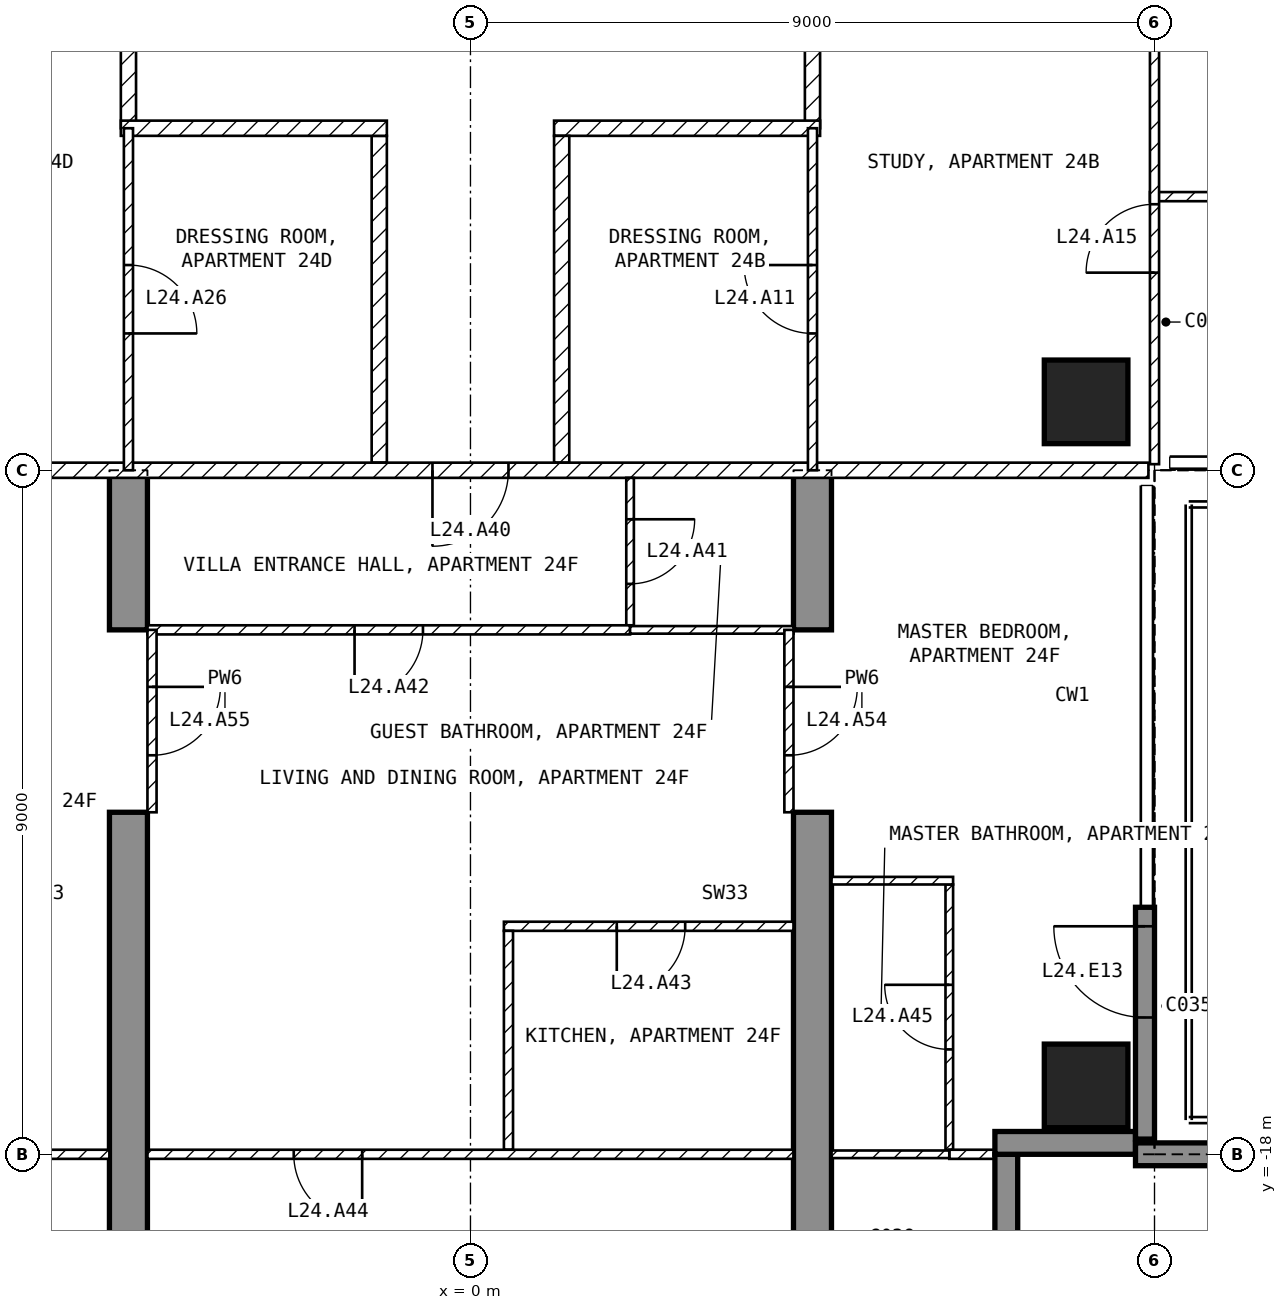
"""IFC4 building model, lengths in metres.
Left out: names, types, materials, properties, quantities, classifications, styles, units other than length and angle.
Written with IfcOpenShell. Run it as: python <this file> out.ifc"""

import sys

from ifc_helpers import new_model, si_unit, direction, frame, frame_2d, origin, origin_2d, place, context, subcontext, project, spatial, polyline, rectangle, outline, extrude, element, fill, save


model = new_model("IFC4")
c1 = context("Model", 3, precision=1e-05, world=origin(), true_north=direction((0.0, 1.0)))
c2 = subcontext(c1, "Body", "Model", "MODEL_VIEW")
j1 = project(units=[si_unit("LENGTHUNIT", "METRE"), si_unit("PLANEANGLEUNIT", "RADIAN")], contexts=[c1])
p1 = place(None, origin())
s1 = spatial("IfcSite", under=j1, at=p1, CompositionType="ELEMENT")
p2 = place(p1, origin())
s2 = spatial("IfcBuilding", under=s1, at=p2, CompositionType="ELEMENT")
p3 = place(p2, frame((0.0, 0.0, 105.9)))
s3 = spatial("IfcBuildingStorey", under=s2, at=p3, CompositionType="ELEMENT", Elevation=105.9)
for number, where, z_axis, x_axis in (
    (1, (8.1, -17.1, -0.25), (0.0, 0.0, 1.0), (1.0, 0.0, 0.0)),
    (2, (8.1, -8.1, -0.25), (0.0, 0.0, 1.0), (1.0, 0.0, 0.0)),
):
    element("IfcColumn", number, at=place(p3, frame(where, z_axis=z_axis, x_axis=x_axis)), inside=s3, PredefinedType="COLUMN", context=c2, shape_type="SweptSolid", body=[
        extrude(rectangle(XDim=1.1, YDim=1.1, at=origin_2d()), origin(), (0.0, 0.0, 1.0), 3.5),
    ])
for number, where, z_axis, x_axis in (
    (3, (-4.75, -20.15, -0.25), (1.0, 0.0, 0.0), (0.0, 1.0, 0.0)),
    (4, (4.25, -20.15, -0.25), (1.0, 0.0, 0.0), (0.0, 1.0, 0.0)),
):
    element("IfcWall", number, at=place(p3, frame(where, z_axis=z_axis, x_axis=x_axis)), inside=s3, PredefinedType="SHEAR", context=c2, shape_type="SweptSolid", body=[
        extrude(outline(polyline([(0.0, 0.0), (6.65, 0.0), (6.65, 2.65), (9.05, 2.65), (9.05, 0.0), (11.15, 0.0), (11.15, 3.5), (0.0, 3.5), (0.0, 0.0)])), origin(), (0.0, 0.0, 1.0), 0.5),
    ])
p4 = place(p3, frame((8.875, -17.8, 0.0), z_axis=(0.0, 0.0, 1.0), x_axis=(0.0, 1.0, 0.0)))
e5 = element("IfcWall", 5, at=p4, inside=s3, PredefinedType="SOLIDWALL", context=c2, shape_type="SweptSolid", body=[
    extrude(rectangle(XDim=3.05, YDim=0.25, at=frame_2d((1.525, 0.0))), origin(), (0.0, 0.0, 1.0), 3.25),
])
p5 = place(p4, frame((1.6, 0.0, 0.0)))
e6 = element("IfcOpeningElement", 6, at=p5, cuts=e5, PredefinedType="OPENING", context=c2, shape_type="SweptSolid", body=[
    extrude(rectangle(XDim=1.2, YDim=2.4, at=frame_2d((0.6, 1.2))), frame((0.0, 0.135, 0.0), z_axis=(0.0, -1.0, 0.0), x_axis=(1.0, 0.0, 0.0)), (0.0, 0.0, 1.0), 0.27),
])
p6 = place(p3, frame((7.05, -19.8, 0.0), z_axis=(0.0, 0.0, 1.0), x_axis=(0.0, 1.0, 0.0)))
e7 = element("IfcWall", 7, at=p6, inside=s3, PredefinedType="SOLIDWALL", context=c2, shape_type="SweptSolid", body=[
    extrude(rectangle(XDim=1.8, YDim=0.3, at=frame_2d((0.9, 0.0))), origin(), (0.0, 0.0, 1.0), 3.25),
])
p7 = place(p3, frame((6.9, -17.85, 0.0), z_axis=(0.0, 0.0, 1.0), x_axis=(1.0, 0.0, 0.0)))
e8 = element("IfcWall", 8, at=p7, inside=s3, PredefinedType="SOLIDWALL", context=c2, shape_type="SweptSolid", body=[
    extrude(rectangle(XDim=1.85, YDim=0.3, at=frame_2d((0.925, 0.0))), origin(), (0.0, 0.0, 1.0), 3.25),
])
p8 = place(p3, frame((8.75, -18.0, 0.0), z_axis=(0.0, 0.0, 1.0), x_axis=(1.0, 0.0, 0.0)))
e9 = element("IfcWall", 9, at=p8, inside=s3, PredefinedType="SOLIDWALL", context=c2, shape_type="SweptSolid", body=[
    extrude(rectangle(XDim=2.99, YDim=0.3, at=frame_2d((1.495, 0.0))), origin(), (0.0, 0.0, 1.0), 3.25),
])
p9 = place(p3, frame((4.5, -1.3, 0.0), z_axis=(0.0, 0.0, 1.0), x_axis=(0.0, -1.0, 0.0)))
e10 = element("IfcWall", 10, at=p9, inside=s3, PredefinedType="PARTITIONING", context=c2, shape_type="SweptSolid", body=[
    extrude(rectangle(XDim=3.2, YDim=0.2, at=frame_2d((1.6, 0.0))), origin(), (0.0, 0.0, 1.0), 3.25),
])
p10 = place(p3, frame((4.6, -4.5, 0.0), z_axis=(0.0, 0.0, 1.0), x_axis=(-1.0, 0.0, 0.0)))
e11 = element("IfcWall", 11, at=p10, inside=s3, PredefinedType="PARTITIONING", context=c2, shape_type="SweptSolid", body=[
    extrude(rectangle(XDim=3.5, YDim=0.2, at=frame_2d((1.75, 0.0))), origin(), (0.0, 0.0, 1.0), 3.25),
])
p11 = place(p3, frame((1.2, -4.6, 0.0), z_axis=(0.0, 0.0, 1.0), x_axis=(0.0, -1.0, 0.0)))
e12 = element("IfcWall", 12, at=p11, inside=s3, PredefinedType="PARTITIONING", context=c2, shape_type="SweptSolid", body=[
    extrude(rectangle(XDim=4.3, YDim=0.2, at=frame_2d((2.15, 0.0))), origin(), (0.0, 0.0, 1.0), 3.25),
])
p12 = place(p3, frame((-4.5, -4.5, 0.0), z_axis=(0.0, 0.0, 1.0), x_axis=(0.0, 1.0, 0.0)))
e13 = element("IfcWall", 13, at=p12, inside=s3, PredefinedType="PARTITIONING", context=c2, shape_type="SweptSolid", body=[
    extrude(rectangle(XDim=3.2, YDim=0.2, at=frame_2d((1.6, 0.0))), origin(), (0.0, 0.0, 1.0), 3.25),
])
p13 = place(p3, frame((-1.2, -8.9, 0.0), z_axis=(0.0, 0.0, 1.0), x_axis=(0.0, 1.0, 0.0)))
e14 = element("IfcWall", 14, at=p13, inside=s3, PredefinedType="PARTITIONING", context=c2, shape_type="SweptSolid", body=[
    extrude(rectangle(XDim=4.3, YDim=0.2, at=frame_2d((2.15, 0.0))), origin(), (0.0, 0.0, 1.0), 3.25),
])
p14 = place(p3, frame((-1.1, -4.5, 0.0), z_axis=(0.0, 0.0, 1.0), x_axis=(-1.0, 0.0, 0.0)))
e15 = element("IfcWall", 15, at=p14, inside=s3, PredefinedType="PARTITIONING", context=c2, shape_type="SweptSolid", body=[
    extrude(rectangle(XDim=3.5, YDim=0.2, at=frame_2d((1.75, 0.0))), origin(), (0.0, 0.0, 1.0), 3.25),
])
p15 = place(p3, frame((8.92, -9.0, 0.0), z_axis=(0.0, 0.0, 1.0), x_axis=(-1.0, 0.0, 0.0)))
e16 = element("IfcWall", 16, at=p15, inside=s3, PredefinedType="PARTITIONING", context=c2, shape_type="SweptSolid", body=[
    extrude(rectangle(XDim=17.84, YDim=0.2, at=frame_2d((8.92, 0.0))), origin(), (0.0, 0.0, 1.0), 3.25),
])
p16 = place(p15, frame((8.42, 0.0, 0.0)))
e17 = element("IfcOpeningElement", 17, at=p16, cuts=e16, PredefinedType="OPENING", context=c2, shape_type="SweptSolid", body=[
    extrude(rectangle(XDim=1.0, YDim=2.1, at=frame_2d((0.5, 1.05))), frame((0.0, 0.11, 0.0), z_axis=(0.0, -1.0, 0.0), x_axis=(1.0, 0.0, 0.0)), (0.0, 0.0, 1.0), 0.22),
])
p17 = place(p3, frame((18.75, -5.4, 0.0), z_axis=(0.0, 0.0, 1.0), x_axis=(-1.0, 0.0, 0.0)))
e18 = element("IfcWall", 18, at=p17, inside=s3, PredefinedType="PARTITIONING", context=c2, shape_type="SweptSolid", body=[
    extrude(rectangle(XDim=9.81, YDim=0.12, at=frame_2d((4.905, 0.0))), origin(), (0.0, 0.0, 1.0), 3.25),
])
p18 = place(p17, frame((7.5, 0.0, 0.0)))
e19 = element("IfcOpeningElement", 19, at=p18, cuts=e18, PredefinedType="OPENING", context=c2, shape_type="SweptSolid", body=[
    extrude(rectangle(XDim=0.9, YDim=2.1, at=frame_2d((0.45, 1.05))), frame((0.0, 0.07, 0.0), z_axis=(0.0, -1.0, 0.0), x_axis=(1.0, 0.0, 0.0)), (0.0, 0.0, 1.0), 0.14),
])
p19 = place(p17, frame((1.425, 0.0, 0.0)))
e20 = element("IfcOpeningElement", 20, at=p19, cuts=e18, PredefinedType="OPENING", context=c2, shape_type="SweptSolid", body=[
    extrude(rectangle(XDim=0.9, YDim=2.1, at=frame_2d((0.45, 1.05))), frame((0.0, 0.07, 0.0), z_axis=(0.0, -1.0, 0.0), x_axis=(1.0, 0.0, 0.0)), (0.0, 0.0, 1.0), 0.14),
])
p20 = place(p3, frame((9.0, -8.92, 0.0), z_axis=(0.0, 0.0, 1.0), x_axis=(0.0, 1.0, 0.0)))
e21 = element("IfcWall", 21, at=p20, inside=s3, PredefinedType="PARTITIONING", context=c2, shape_type="SweptSolid", body=[
    extrude(rectangle(XDim=7.62, YDim=0.12, at=frame_2d((3.81, 0.0))), origin(), (0.0, 0.0, 1.0), 3.25),
])
p21 = place(p20, frame((2.52, 0.0, 0.0)))
e22 = element("IfcOpeningElement", 22, at=p21, cuts=e21, PredefinedType="OPENING", context=c2, shape_type="SweptSolid", body=[
    extrude(rectangle(XDim=0.9, YDim=2.1, at=frame_2d((0.45, 1.05))), frame((0.0, 0.07, 0.0), z_axis=(0.0, -1.0, 0.0), x_axis=(1.0, 0.0, 0.0)), (0.0, 0.0, 1.0), 0.14),
])
p22 = place(p3, frame((4.5, -9.0, 0.0), z_axis=(0.0, 0.0, 1.0), x_axis=(0.0, 1.0, 0.0)))
e23 = element("IfcWall", 23, at=p22, inside=s3, PredefinedType="PARTITIONING", context=c2, shape_type="SweptSolid", body=[
    extrude(rectangle(XDim=4.5, YDim=0.12, at=frame_2d((2.25, 0.0))), origin(), (0.0, 0.0, 1.0), 3.25),
])
p23 = place(p22, frame((1.8, 0.0, 0.0)))
e24 = element("IfcOpeningElement", 24, at=p23, cuts=e23, PredefinedType="OPENING", context=c2, shape_type="SweptSolid", body=[
    extrude(rectangle(XDim=0.9, YDim=2.1, at=frame_2d((0.45, 1.05))), frame((0.0, 0.07, 0.0), z_axis=(0.0, -1.0, 0.0), x_axis=(1.0, 0.0, 0.0)), (0.0, 0.0, 1.0), 0.14),
])
p24 = place(p3, frame((-4.5, -4.5, 0.0), z_axis=(0.0, 0.0, 1.0), x_axis=(0.0, -1.0, 0.0)))
e25 = element("IfcWall", 25, at=p24, inside=s3, PredefinedType="PARTITIONING", context=c2, shape_type="SweptSolid", body=[
    extrude(rectangle(XDim=4.5, YDim=0.12, at=frame_2d((2.25, 0.0))), origin(), (0.0, 0.0, 1.0), 3.25),
])
p25 = place(p24, frame((1.8, 0.0, 0.0)))
e26 = element("IfcOpeningElement", 26, at=p25, cuts=e25, PredefinedType="OPENING", context=c2, shape_type="SweptSolid", body=[
    extrude(rectangle(XDim=0.9, YDim=2.1, at=frame_2d((0.45, 1.05))), frame((0.0, 0.07, 0.0), z_axis=(0.0, -1.0, 0.0), x_axis=(1.0, 0.0, 0.0)), (0.0, 0.0, 1.0), 0.14),
])
p26 = place(p3, frame((2.1, -9.1, 0.0), z_axis=(0.0, 0.0, 1.0), x_axis=(0.0, -1.0, 0.0)))
e27 = element("IfcWall", 27, at=p26, inside=s3, PredefinedType="PARTITIONING", context=c2, shape_type="SweptSolid", body=[
    extrude(rectangle(XDim=1.94, YDim=0.1, at=frame_2d((0.97, 0.0))), origin(), (0.0, 0.0, 1.0), 3.25),
])
p27 = place(p26, frame((0.545, 0.0, 0.0)))
e28 = element("IfcOpeningElement", 28, at=p27, cuts=e27, PredefinedType="OPENING", context=c2, shape_type="SweptSolid", body=[
    extrude(rectangle(XDim=0.85, YDim=2.1, at=frame_2d((0.425, 1.05))), frame((0.0, 0.06, 0.0), z_axis=(0.0, -1.0, 0.0), x_axis=(1.0, 0.0, 0.0)), (0.0, 0.0, 1.0), 0.12),
])
p28 = place(p3, frame((2.1, -11.1, 0.0), z_axis=(0.0, 0.0, 1.0), x_axis=(-1.0, 0.0, 0.0)))
e29 = element("IfcWall", 29, at=p28, inside=s3, PredefinedType="PARTITIONING", context=c2, shape_type="SweptSolid", body=[
    extrude(rectangle(XDim=6.35, YDim=0.12, at=frame_2d((3.175, 0.0))), origin(), (0.0, 0.0, 1.0), 3.25),
])
p29 = place(p28, frame((2.725, 0.0, 0.0)))
e30 = element("IfcOpeningElement", 30, at=p29, cuts=e29, PredefinedType="OPENING", context=c2, shape_type="SweptSolid", body=[
    extrude(rectangle(XDim=0.9, YDim=2.1, at=frame_2d((0.45, 1.05))), frame((0.0, 0.07, 0.0), z_axis=(0.0, -1.0, 0.0), x_axis=(1.0, 0.0, 0.0)), (0.0, 0.0, 1.0), 0.14),
])
p30 = place(p3, frame((4.25, -11.1, 0.0), z_axis=(0.0, 0.0, 1.0), x_axis=(-1.0, 0.0, 0.0)))
e31 = element("IfcWall", 31, at=p30, inside=s3, PredefinedType="PARTITIONING", context=c2, shape_type="SweptSolid", body=[
    extrude(rectangle(XDim=2.15, YDim=0.1, at=frame_2d((1.075, 0.0))), origin(), (0.0, 0.0, 1.0), 3.25),
])
p31 = place(p3, frame((4.25, -15.0, 0.0), z_axis=(0.0, 0.0, 1.0), x_axis=(-1.0, 0.0, 0.0)))
e32 = element("IfcWall", 32, at=p31, inside=s3, PredefinedType="PARTITIONING", context=c2, shape_type="SweptSolid", body=[
    extrude(rectangle(XDim=3.81, YDim=0.12, at=frame_2d((1.905, 0.0))), origin(), (0.0, 0.0, 1.0), 3.25),
])
p32 = place(p31, frame((1.425, 0.0, 0.0)))
e33 = element("IfcOpeningElement", 33, at=p32, cuts=e32, PredefinedType="OPENING", context=c2, shape_type="SweptSolid", body=[
    extrude(rectangle(XDim=0.9, YDim=2.1, at=frame_2d((0.45, 1.05))), frame((0.0, 0.07, 0.0), z_axis=(0.0, -1.0, 0.0), x_axis=(1.0, 0.0, 0.0)), (0.0, 0.0, 1.0), 0.14),
])
p33 = place(p3, frame((0.5, -15.06, 0.0), z_axis=(0.0, 0.0, 1.0), x_axis=(0.0, -1.0, 0.0)))
e34 = element("IfcWall", 34, at=p33, inside=s3, PredefinedType="PARTITIONING", context=c2, shape_type="SweptSolid", body=[
    extrude(rectangle(XDim=2.88, YDim=0.12, at=frame_2d((1.44, 0.0))), origin(), (0.0, 0.0, 1.0), 3.25),
])
p34 = place(p3, frame((4.25, -18.0, 0.0), z_axis=(0.0, 0.0, 1.0), x_axis=(-1.0, 0.0, 0.0)))
e35 = element("IfcWall", 35, at=p34, inside=s3, PredefinedType="PARTITIONING", context=c2, shape_type="SweptSolid", body=[
    extrude(rectangle(XDim=8.5, YDim=0.12, at=frame_2d((4.25, 0.0))), origin(), (0.0, 0.0, 1.0), 3.25),
])
p35 = place(p34, frame((5.675, 0.0, 0.0)))
e36 = element("IfcOpeningElement", 36, at=p35, cuts=e35, PredefinedType="OPENING", context=c2, shape_type="SweptSolid", body=[
    extrude(rectangle(XDim=0.9, YDim=2.1, at=frame_2d((0.45, 1.05))), frame((0.0, 0.07, 0.0), z_axis=(0.0, -1.0, 0.0), x_axis=(1.0, 0.0, 0.0)), (0.0, 0.0, 1.0), 0.14),
])
p36 = place(p3, frame((6.3, -17.94, 0.0), z_axis=(0.0, 0.0, 1.0), x_axis=(0.0, 1.0, 0.0)))
e37 = element("IfcWall", 37, at=p36, inside=s3, PredefinedType="PARTITIONING", context=c2, shape_type="SweptSolid", body=[
    extrude(rectangle(XDim=3.49, YDim=0.1, at=frame_2d((1.745, 0.0))), origin(), (0.0, 0.0, 1.0), 3.25),
])
p37 = place(p36, frame((1.32, 0.0, 0.0)))
e38 = element("IfcOpeningElement", 38, at=p37, cuts=e37, PredefinedType="OPENING", context=c2, shape_type="SweptSolid", body=[
    extrude(rectangle(XDim=0.85, YDim=2.1, at=frame_2d((0.425, 1.05))), frame((0.0, 0.06, 0.0), z_axis=(0.0, -1.0, 0.0), x_axis=(1.0, 0.0, 0.0)), (0.0, 0.0, 1.0), 0.12),
])
p38 = place(p3, frame((6.35, -14.4, 0.0), z_axis=(0.0, 0.0, 1.0), x_axis=(-1.0, 0.0, 0.0)))
e39 = element("IfcWall", 39, at=p38, inside=s3, PredefinedType="PARTITIONING", context=c2, shape_type="SweptSolid", body=[
    extrude(rectangle(XDim=1.6, YDim=0.1, at=frame_2d((0.8, 0.0))), origin(), (0.0, 0.0, 1.0), 3.25),
])
p39 = place(p3, frame((7.12, -18.0, 0.0), z_axis=(0.0, 0.0, 1.0), x_axis=(-1.0, 0.0, 0.0)))
e40 = element("IfcWall", 40, at=p39, inside=s3, PredefinedType="PARTITIONING", context=c2, shape_type="SweptSolid", body=[
    extrude(rectangle(XDim=0.82, YDim=0.12, at=frame_2d((0.41, 0.0))), origin(), (0.0, 0.0, 1.0), 3.25),
])
p40 = place(p3, frame((6.3, -18.0, 0.0), z_axis=(0.0, 0.0, 1.0), x_axis=(-1.0, 0.0, 0.0)))
e41 = element("IfcWall", 41, at=p40, inside=s3, PredefinedType="PARTITIONING", context=c2, shape_type="SweptSolid", body=[
    extrude(rectangle(XDim=1.55, YDim=0.1, at=frame_2d((0.775, 0.0))), origin(), (0.0, 0.0, 1.0), 3.25),
])
p41 = place(p3, frame((-4.75, -18.0, 0.0), z_axis=(0.0, 0.0, 1.0), x_axis=(-1.0, 0.0, 0.0)))
e42 = element("IfcWall", 42, at=p41, inside=s3, PredefinedType="PARTITIONING", context=c2, shape_type="SweptSolid", body=[
    extrude(rectangle(XDim=2.37, YDim=0.12, at=frame_2d((1.185, 0.0))), origin(), (0.0, 0.0, 1.0), 3.25),
])
p42 = place(p3, frame((4.19, -11.1, 0.0), z_axis=(0.0, 0.0, 1.0), x_axis=(0.0, -1.0, 0.0)))
e43 = element("IfcWall", 43, at=p42, inside=s3, PredefinedType="PARTITIONING", context=c2, shape_type="SweptSolid", body=[
    extrude(rectangle(XDim=2.4, YDim=0.12, at=frame_2d((1.2, 0.0))), origin(), (0.0, 0.0, 1.0), 2.4),
])
p43 = place(p42, frame((0.75, 0.0, 0.0)))
e44 = element("IfcOpeningElement", 44, at=p43, cuts=e43, PredefinedType="OPENING", context=c2, shape_type="SweptSolid", body=[
    extrude(rectangle(XDim=0.9, YDim=2.1, at=frame_2d((0.45, 1.05))), frame((0.0, 0.07, 0.0), z_axis=(0.0, -1.0, 0.0), x_axis=(1.0, 0.0, 0.0)), (0.0, 0.0, 1.0), 0.14),
])
p44 = place(p3, frame((-4.19, -11.1, 0.0), z_axis=(0.0, 0.0, 1.0), x_axis=(0.0, -1.0, 0.0)))
e45 = element("IfcWall", 45, at=p44, inside=s3, PredefinedType="PARTITIONING", context=c2, shape_type="SweptSolid", body=[
    extrude(rectangle(XDim=2.4, YDim=0.12, at=frame_2d((1.2, 0.0))), origin(), (0.0, 0.0, 1.0), 2.4),
])
p45 = place(p44, frame((0.75, 0.0, 0.0)))
e46 = element("IfcOpeningElement", 46, at=p45, cuts=e45, PredefinedType="OPENING", context=c2, shape_type="SweptSolid", body=[
    extrude(rectangle(XDim=0.9, YDim=2.1, at=frame_2d((0.45, 1.05))), frame((0.0, 0.07, 0.0), z_axis=(0.0, -1.0, 0.0), x_axis=(1.0, 0.0, 0.0)), (0.0, 0.0, 1.0), 0.14),
])
p46 = place(p5, origin())
e47 = element("IfcDoor", 47, at=p46, inside=s3, OperationType="SINGLE_SWING_RIGHT", PredefinedType="DOOR", context=c2, shape_type="SweptSolid", body=[
    extrude(rectangle(XDim=1.2, YDim=2.4, at=frame_2d((0.6, 1.2))), frame((0.0, 0.025, 0.0), z_axis=(0.0, -1.0, 0.0), x_axis=(1.0, 0.0, 0.0)), (0.0, 0.0, 1.0), 0.05),
])
fill(e6, e47)
p47 = place(p23, origin())
e48 = element("IfcDoor", 48, at=p47, inside=s3, OperationType="SINGLE_SWING_RIGHT", PredefinedType="DOOR", context=c2, shape_type="SweptSolid", body=[
    extrude(rectangle(XDim=0.9, YDim=2.1, at=frame_2d((0.45, 1.05))), frame((0.0, 0.025, 0.0), z_axis=(0.0, -1.0, 0.0), x_axis=(1.0, 0.0, 0.0)), (0.0, 0.0, 1.0), 0.05),
])
fill(e24, e48)
p48 = place(p21, origin())
e49 = element("IfcDoor", 49, at=p48, inside=s3, OperationType="SINGLE_SWING_LEFT", PredefinedType="DOOR", context=c2, shape_type="SweptSolid", body=[
    extrude(rectangle(XDim=0.9, YDim=2.1, at=frame_2d((0.45, 1.05))), frame((0.0, 0.025, 0.0), z_axis=(0.0, -1.0, 0.0), x_axis=(1.0, 0.0, 0.0)), (0.0, 0.0, 1.0), 0.05),
])
fill(e22, e49)
p49 = place(p25, origin())
e50 = element("IfcDoor", 50, at=p49, inside=s3, OperationType="SINGLE_SWING_RIGHT", PredefinedType="DOOR", context=c2, shape_type="SweptSolid", body=[
    extrude(rectangle(XDim=0.9, YDim=2.1, at=frame_2d((0.45, 1.05))), frame((0.0, 0.025, 0.0), z_axis=(0.0, -1.0, 0.0), x_axis=(1.0, 0.0, 0.0)), (0.0, 0.0, 1.0), 0.05),
])
fill(e26, e50)
p50 = place(p16, origin())
e51 = element("IfcDoor", 51, at=p50, inside=s3, OperationType="SINGLE_SWING_RIGHT", PredefinedType="DOOR", context=c2, shape_type="SweptSolid", body=[
    extrude(rectangle(XDim=1.0, YDim=2.1, at=frame_2d((0.5, 1.05))), frame((0.0, 0.025, 0.0), z_axis=(0.0, -1.0, 0.0), x_axis=(1.0, 0.0, 0.0)), (0.0, 0.0, 1.0), 0.05),
])
fill(e17, e51)
p51 = place(p27, origin())
e52 = element("IfcDoor", 52, at=p51, inside=s3, OperationType="SINGLE_SWING_LEFT", PredefinedType="DOOR", context=c2, shape_type="SweptSolid", body=[
    extrude(rectangle(XDim=0.85, YDim=2.1, at=frame_2d((0.425, 1.05))), frame((0.0, 0.025, 0.0), z_axis=(0.0, -1.0, 0.0), x_axis=(1.0, 0.0, 0.0)), (0.0, 0.0, 1.0), 0.05),
])
fill(e28, e52)
p52 = place(p29, origin())
e53 = element("IfcDoor", 53, at=p52, inside=s3, OperationType="SINGLE_SWING_RIGHT", PredefinedType="DOOR", context=c2, shape_type="SweptSolid", body=[
    extrude(rectangle(XDim=0.9, YDim=2.1, at=frame_2d((0.45, 1.05))), frame((0.0, 0.025, 0.0), z_axis=(0.0, -1.0, 0.0), x_axis=(1.0, 0.0, 0.0)), (0.0, 0.0, 1.0), 0.05),
])
fill(e30, e53)
p53 = place(p32, origin())
e54 = element("IfcDoor", 54, at=p53, inside=s3, OperationType="SINGLE_SWING_RIGHT", PredefinedType="DOOR", context=c2, shape_type="SweptSolid", body=[
    extrude(rectangle(XDim=0.9, YDim=2.1, at=frame_2d((0.45, 1.05))), frame((0.0, 0.025, 0.0), z_axis=(0.0, -1.0, 0.0), x_axis=(1.0, 0.0, 0.0)), (0.0, 0.0, 1.0), 0.05),
])
fill(e33, e54)
p54 = place(p35, origin())
e55 = element("IfcDoor", 55, at=p54, inside=s3, OperationType="SINGLE_SWING_LEFT", PredefinedType="DOOR", context=c2, shape_type="SweptSolid", body=[
    extrude(rectangle(XDim=0.9, YDim=2.1, at=frame_2d((0.45, 1.05))), frame((0.0, 0.025, 0.0), z_axis=(0.0, -1.0, 0.0), x_axis=(1.0, 0.0, 0.0)), (0.0, 0.0, 1.0), 0.05),
])
fill(e36, e55)
p55 = place(p37, origin())
e56 = element("IfcDoor", 56, at=p55, inside=s3, OperationType="SINGLE_SWING_RIGHT", PredefinedType="DOOR", context=c2, shape_type="SweptSolid", body=[
    extrude(rectangle(XDim=0.85, YDim=2.1, at=frame_2d((0.425, 1.05))), frame((0.0, 0.025, 0.0), z_axis=(0.0, -1.0, 0.0), x_axis=(1.0, 0.0, 0.0)), (0.0, 0.0, 1.0), 0.05),
])
fill(e38, e56)
p56 = place(p43, origin())
e57 = element("IfcDoor", 57, at=p56, inside=s3, OperationType="SINGLE_SWING_LEFT", PredefinedType="DOOR", context=c2, shape_type="SweptSolid", body=[
    extrude(rectangle(XDim=0.9, YDim=2.1, at=frame_2d((0.45, 1.05))), frame((0.0, 0.025, 0.0), z_axis=(0.0, -1.0, 0.0), x_axis=(1.0, 0.0, 0.0)), (0.0, 0.0, 1.0), 0.05),
])
fill(e44, e57)
p57 = place(p45, origin())
e58 = element("IfcDoor", 58, at=p57, inside=s3, OperationType="SINGLE_SWING_LEFT", PredefinedType="DOOR", context=c2, shape_type="SweptSolid", body=[
    extrude(rectangle(XDim=0.9, YDim=2.1, at=frame_2d((0.45, 1.05))), frame((0.0, 0.025, 0.0), z_axis=(0.0, -1.0, 0.0), x_axis=(1.0, 0.0, 0.0)), (0.0, 0.0, 1.0), 0.05),
])
fill(e46, e58)
save(model, sys.argv[1])
